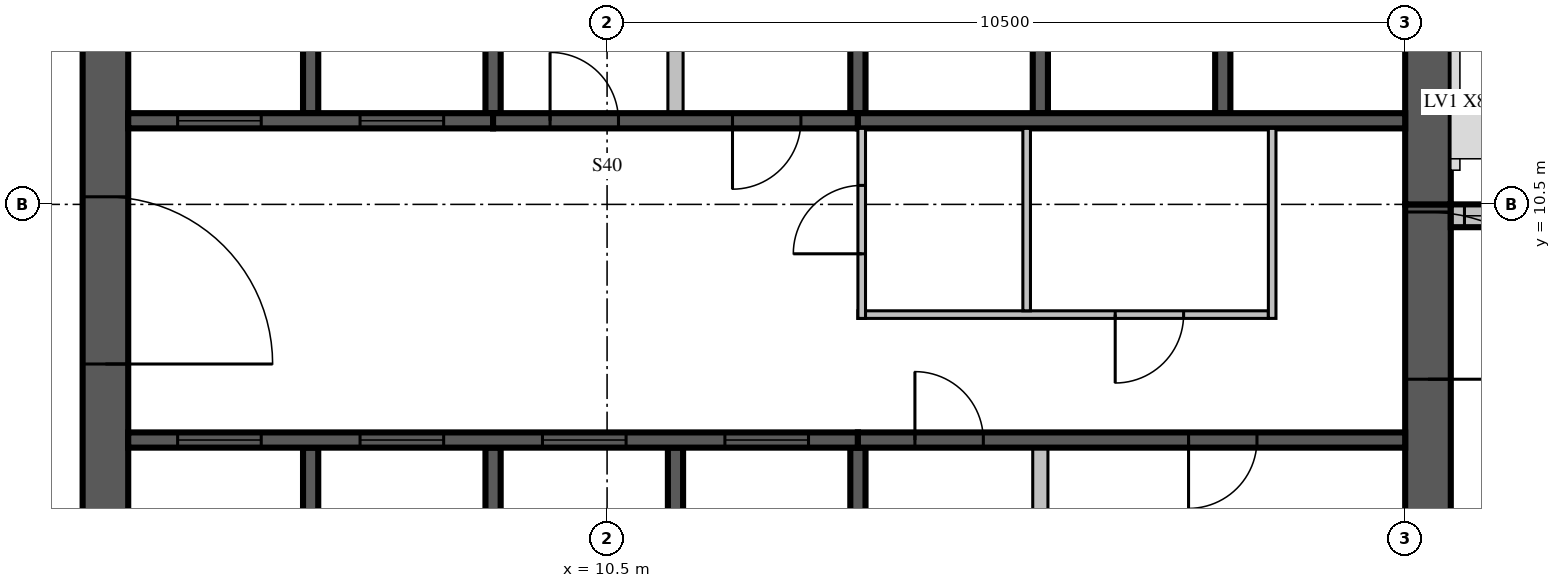
"""IFC4 building model, lengths in metres.
Left out: names, types, materials, properties, quantities, classifications, styles, units other than length and angle.
Written with IfcOpenShell. Run it as: python <this file> out.ifc"""

import sys

from ifc_helpers import new_model, si_unit, direction, frame, frame_2d, origin, place, context, subcontext, project, spatial, rectangle, extrude, source, transform, mapped, element, fill, save


model = new_model("IFC4")
c1 = context("Model", 3, precision=1e-05, world=origin(), true_north=direction((0.0, 1.0)))
c2 = subcontext(c1, "Body", "Model", "MODEL_VIEW")
j1 = project(units=[si_unit("LENGTHUNIT", "METRE"), si_unit("PLANEANGLEUNIT", "RADIAN")], contexts=[c1])
p1 = place(None, origin())
s1 = spatial("IfcSite", under=j1, at=p1, CompositionType="ELEMENT")
p2 = place(p1, origin())
s2 = spatial("IfcBuilding", under=s1, at=p2, CompositionType="ELEMENT")
p3 = place(p2, frame((0.0, 0.0, 316.0)))
s3 = spatial("IfcBuildingStorey", under=s2, at=p3, CompositionType="ELEMENT", Elevation=316.0)
m1 = source(origin(), c2, "Body", "SweptSolid", [
    extrude(rectangle(XDim=17.4, YDim=0.6, at=frame_2d((8.7, 0.0))), origin(), (0.0, 0.0, 1.0), 3.5),
])
p4 = place(p3, frame((3.9, 4.2, 0.0), z_axis=(0.0, 0.0, 1.0), x_axis=(0.0, 1.0, 0.0)))
e1 = element("IfcWall", 1, at=p4, inside=s3, PredefinedType="SHEAR", context=c2, shape_type="MappedRepresentation", body=[
    mapped(m1, transform((0.0, 0.0, 0.0), scale=1.0)),
])
m2 = source(origin(), c2, "Body", "SweptSolid", [
    extrude(rectangle(XDim=2.2, YDim=2.1, at=frame_2d((1.1, 1.05))), frame((0.0, 0.31, 0.0), z_axis=(0.0, -1.0, 0.0), x_axis=(1.0, 0.0, 0.0)), (0.0, 0.0, 1.0), 0.62),
])
p5 = place(p4, frame((4.2, 0.0, 0.0)))
e2 = element("IfcOpeningElement", 2, at=p5, cuts=e1, PredefinedType="OPENING", context=c2, shape_type="MappedRepresentation", body=[
    mapped(m2, transform((0.0, 0.0, 0.0), scale=1.0)),
])
m3 = source(origin(), c2, "Body", "SweptSolid", [
    extrude(rectangle(XDim=6.3, YDim=0.6, at=frame_2d((3.15, 0.0))), origin(), (0.0, 0.0, 1.0), 3.5),
])
p6 = place(p3, frame((21.3, 4.2, 0.0), z_axis=(0.0, 0.0, 1.0), x_axis=(0.0, 1.0, 0.0)))
e3 = element("IfcWall", 3, at=p6, inside=s3, PredefinedType="SHEAR", context=c2, shape_type="MappedRepresentation", body=[
    mapped(m3, transform((0.0, 0.0, 0.0), scale=1.0)),
])
p7 = place(p6, frame((4.0, 0.0, 0.0)))
e4 = element("IfcOpeningElement", 4, at=p7, cuts=e3, PredefinedType="OPENING", context=c2, shape_type="MappedRepresentation", body=[
    mapped(m2, transform((0.0, 0.0, 0.0), scale=1.0)),
])
m4 = source(origin(), c2, "Body", "SweptSolid", [
    extrude(rectangle(XDim=10.5, YDim=0.6, at=frame_2d((5.25, 0.0))), origin(), (0.0, 0.0, 1.0), 3.5),
])
p8 = place(p3, frame((21.3, 10.5, 0.0), z_axis=(0.0, 0.0, 1.0), x_axis=(0.0, 1.0, 0.0)))
e5 = element("IfcWall", 5, at=p8, inside=s3, PredefinedType="SHEAR", context=c2, shape_type="MappedRepresentation", body=[
    mapped(m4, transform((0.0, 0.0, 0.0), scale=1.0)),
])
m5 = source(origin(), c2, "Body", "SweptSolid", [
    extrude(rectangle(XDim=1.2, YDim=2.4, at=frame_2d((0.6, 1.2))), frame((0.0, 0.31, 0.0), z_axis=(0.0, -1.0, 0.0), x_axis=(1.0, 0.0, 0.0)), (0.0, 0.0, 1.0), 0.62),
])
p9 = place(p8, frame((5.7, 0.0, 0.6)))
e6 = element("IfcOpeningElement", 6, at=p9, cuts=e5, PredefinedType="OPENING", context=c2, shape_type="MappedRepresentation", body=[
    mapped(m5, transform((0.0, 0.0, 0.0), scale=1.0)),
])
m6 = source(origin(), c2, "Body", "SweptSolid", [
    extrude(rectangle(XDim=7.45, YDim=0.3, at=frame_2d((3.725, 0.0))), origin(), (0.0, 0.0, 1.0), 3.1),
])
p10 = place(p3, frame((29.05, 10.35, 0.0), z_axis=(0.0, 0.0, 1.0), x_axis=(-1.0, 0.0, 0.0)))
e7 = element("IfcWall", 7, at=p10, inside=s3, PredefinedType="STANDARD", context=c2, shape_type="MappedRepresentation", body=[
    mapped(m6, transform((0.0, 0.0, 0.0), scale=1.0)),
])
m7 = source(origin(), c2, "Body", "SweptSolid", [
    extrude(rectangle(XDim=3.0, YDim=2.0, at=frame_2d((1.5, 1.0))), frame((0.0, 0.16, 0.0), z_axis=(0.0, -1.0, 0.0), x_axis=(1.0, 0.0, 0.0)), (0.0, 0.0, 1.0), 0.32),
])
p11 = place(p10, frame((1.09, 0.0, 0.6)))
e8 = element("IfcOpeningElement", 8, at=p11, cuts=e7, PredefinedType="OPENING", context=c2, shape_type="MappedRepresentation", body=[
    mapped(m7, transform((0.0, 0.0, 0.0), scale=1.0)),
])
m8 = source(origin(), c2, "Body", "SweptSolid", [
    extrude(rectangle(XDim=1.8, YDim=2.0, at=frame_2d((0.9, 1.0))), frame((0.0, 0.16, 0.0), z_axis=(0.0, -1.0, 0.0), x_axis=(1.0, 0.0, 0.0)), (0.0, 0.0, 1.0), 0.32),
])
p12 = place(p10, frame((5.47, 0.0, 0.6)))
e9 = element("IfcOpeningElement", 9, at=p12, cuts=e7, PredefinedType="OPENING", context=c2, shape_type="MappedRepresentation", body=[
    mapped(m8, transform((0.0, 0.0, 0.0), scale=1.0)),
])
m9 = source(origin(), c2, "Body", "SweptSolid", [
    extrude(rectangle(XDim=3.1, YDim=0.2, at=frame_2d((1.55, 0.0))), origin(), (0.0, 0.0, 1.0), 3.5),
])
for number, where, z_axis, x_axis in (
    (10, (6.6, 4.2, 0.0), (0.0, 0.0, 1.0), (0.0, 1.0, 0.0)),
    (11, (9.0, 4.2, 0.0), (0.0, 0.0, 1.0), (0.0, 1.0, 0.0)),
    (12, (11.4, 4.2, 0.0), (0.0, 0.0, 1.0), (0.0, 1.0, 0.0)),
):
    element("IfcWall", number, at=place(p3, frame(where, z_axis=z_axis, x_axis=x_axis)), inside=s3, PredefinedType="SOLIDWALL", context=c2, shape_type="MappedRepresentation", body=[
        mapped(m9, transform((0.0, 0.0, 0.0), scale=1.0)),
    ])
m10 = source(origin(), c2, "Body", "SweptSolid", [
    extrude(rectangle(XDim=3.1, YDim=0.2, at=frame_2d((1.55, 0.0))), origin(), (0.0, 0.0, 1.0), 3.1),
])
p13 = place(p3, frame((13.8, 4.2, 0.0), z_axis=(0.0, 0.0, 1.0), x_axis=(0.0, 1.0, 0.0)))
e13 = element("IfcWall", 13, at=p13, inside=s3, PredefinedType="SOLIDWALL", context=c2, shape_type="MappedRepresentation", body=[
    mapped(m10, transform((0.0, 0.0, 0.0), scale=1.0)),
])
m11 = source(origin(), c2, "Body", "SweptSolid", [
    extrude(rectangle(XDim=3.1, YDim=0.2, at=frame_2d((1.55, 0.0))), origin(), (0.0, 0.0, 1.0), 3.1),
])
p14 = place(p3, frame((16.2, 4.2, 0.0), z_axis=(0.0, 0.0, 1.0), x_axis=(0.0, 1.0, 0.0)))
e14 = element("IfcWall", 14, at=p14, inside=s3, PredefinedType="PARTITIONING", context=c2, shape_type="MappedRepresentation", body=[
    mapped(m11, transform((0.0, 0.0, 0.0), scale=1.0)),
])
m12 = source(origin(), c2, "Body", "SweptSolid", [
    extrude(rectangle(XDim=3.0, YDim=0.2, at=frame_2d((1.5, 0.0))), origin(), (0.0, 0.0, 1.0), 3.5),
])
p15 = place(p3, frame((6.6, 11.7, 0.0), z_axis=(0.0, 0.0, 1.0), x_axis=(0.0, 1.0, 0.0)))
e15 = element("IfcWall", 15, at=p15, inside=s3, PredefinedType="SOLIDWALL", context=c2, shape_type="MappedRepresentation", body=[
    mapped(m12, transform((0.0, 0.0, 0.0), scale=1.0)),
])
m13 = source(origin(), c2, "Body", "SweptSolid", [
    extrude(rectangle(XDim=3.0, YDim=0.2, at=frame_2d((1.5, 0.0))), origin(), (0.0, 0.0, 1.0), 3.1),
])
for number, where, z_axis, x_axis in (
    (16, (9.0, 11.7, 0.0), (0.0, 0.0, 1.0), (0.0, 1.0, 0.0)),
    (17, (13.8, 11.7, 0.0), (0.0, 0.0, 1.0), (0.0, 1.0, 0.0)),
):
    element("IfcWall", number, at=place(p3, frame(where, z_axis=z_axis, x_axis=x_axis)), inside=s3, PredefinedType="SOLIDWALL", context=c2, shape_type="MappedRepresentation", body=[
        mapped(m13, transform((0.0, 0.0, 0.0), scale=1.0)),
    ])
for number, where, z_axis, x_axis in (
    (18, (16.2, 11.7, 0.0), (0.0, 0.0, 1.0), (0.0, 1.0, 0.0)),
    (19, (18.6, 11.7, 0.0), (0.0, 0.0, 1.0), (0.0, 1.0, 0.0)),
):
    element("IfcWall", number, at=place(p3, frame(where, z_axis=z_axis, x_axis=x_axis)), inside=s3, PredefinedType="SOLIDWALL", context=c2, shape_type="MappedRepresentation", body=[
        mapped(m12, transform((0.0, 0.0, 0.0), scale=1.0)),
    ])
m14 = source(origin(), c2, "Body", "SweptSolid", [
    extrude(rectangle(XDim=3.0, YDim=0.2, at=frame_2d((1.5, 0.0))), origin(), (0.0, 0.0, 1.0), 3.1),
])
p16 = place(p3, frame((11.4, 11.7, 0.0), z_axis=(0.0, 0.0, 1.0), x_axis=(0.0, 1.0, 0.0)))
e20 = element("IfcWall", 20, at=p16, inside=s3, PredefinedType="PARTITIONING", context=c2, shape_type="MappedRepresentation", body=[
    mapped(m14, transform((0.0, 0.0, 0.0), scale=1.0)),
])
m15 = source(origin(), c2, "Body", "SweptSolid", [
    extrude(rectangle(XDim=9.6, YDim=0.2, at=frame_2d((4.8, 0.0))), origin(), (0.0, 0.0, 1.0), 3.5),
])
p17 = place(p3, frame((4.2, 7.4, 0.0), z_axis=(0.0, 0.0, 1.0), x_axis=(1.0, 0.0, 0.0)))
e21 = element("IfcWall", 21, at=p17, inside=s3, PredefinedType="SOLIDWALL", context=c2, shape_type="MappedRepresentation", body=[
    mapped(m15, transform((0.0, 0.0, 0.0), scale=1.0)),
])
m16 = source(origin(), c2, "Body", "SweptSolid", [
    extrude(rectangle(XDim=1.1, YDim=2.1, at=frame_2d((0.55, 1.05))), frame((0.0, 0.11, 0.0), z_axis=(0.0, -1.0, 0.0), x_axis=(1.0, 0.0, 0.0)), (0.0, 0.0, 1.0), 0.22),
])
p18 = place(p17, frame((0.65, 0.0, 0.0)))
e22 = element("IfcOpeningElement", 22, at=p18, cuts=e21, PredefinedType="OPENING", context=c2, shape_type="MappedRepresentation", body=[
    mapped(m16, transform((0.0, 0.0, 0.0), scale=1.0)),
])
p19 = place(p17, frame((3.05, 0.0, 0.0)))
e23 = element("IfcOpeningElement", 23, at=p19, cuts=e21, PredefinedType="OPENING", context=c2, shape_type="MappedRepresentation", body=[
    mapped(m16, transform((0.0, 0.0, 0.0), scale=1.0)),
])
p20 = place(p17, frame((5.45, 0.0, 0.0)))
e24 = element("IfcOpeningElement", 24, at=p20, cuts=e21, PredefinedType="OPENING", context=c2, shape_type="MappedRepresentation", body=[
    mapped(m16, transform((0.0, 0.0, 0.0), scale=1.0)),
])
p21 = place(p17, frame((7.85, 0.0, 0.0)))
e25 = element("IfcOpeningElement", 25, at=p21, cuts=e21, PredefinedType="OPENING", context=c2, shape_type="MappedRepresentation", body=[
    mapped(m16, transform((0.0, 0.0, 0.0), scale=1.0)),
])
m17 = source(origin(), c2, "Body", "SweptSolid", [
    extrude(rectangle(XDim=7.2, YDim=0.2, at=frame_2d((3.6, 0.0))), origin(), (0.0, 0.0, 1.0), 3.1),
])
p22 = place(p3, frame((13.8, 7.4, 0.0), z_axis=(0.0, 0.0, 1.0), x_axis=(1.0, 0.0, 0.0)))
e26 = element("IfcWall", 26, at=p22, inside=s3, PredefinedType="SOLIDWALL", context=c2, shape_type="MappedRepresentation", body=[
    mapped(m17, transform((0.0, 0.0, 0.0), scale=1.0)),
])
m18 = source(origin(), c2, "Body", "SweptSolid", [
    extrude(rectangle(XDim=0.9, YDim=2.1, at=frame_2d((0.45, 1.05))), frame((0.0, 0.11, 0.0), z_axis=(0.0, -1.0, 0.0), x_axis=(1.0, 0.0, 0.0)), (0.0, 0.0, 1.0), 0.22),
])
p23 = place(p22, frame((0.75, 0.0, 0.0)))
e27 = element("IfcOpeningElement", 27, at=p23, cuts=e26, PredefinedType="OPENING", context=c2, shape_type="MappedRepresentation", body=[
    mapped(m18, transform((0.0, 0.0, 0.0), scale=1.0)),
])
p24 = place(p22, frame((4.35, 0.0, 0.0)))
e28 = element("IfcOpeningElement", 28, at=p24, cuts=e26, PredefinedType="OPENING", context=c2, shape_type="MappedRepresentation", body=[
    mapped(m18, transform((0.0, 0.0, 0.0), scale=1.0)),
])
m19 = source(origin(), c2, "Body", "SweptSolid", [
    extrude(rectangle(XDim=4.8, YDim=0.2, at=frame_2d((2.4, 0.0))), origin(), (0.0, 0.0, 1.0), 3.5),
])
p25 = place(p3, frame((4.2, 11.6, 0.0), z_axis=(0.0, 0.0, 1.0), x_axis=(1.0, 0.0, 0.0)))
e29 = element("IfcWall", 29, at=p25, inside=s3, PredefinedType="SOLIDWALL", context=c2, shape_type="MappedRepresentation", body=[
    mapped(m19, transform((0.0, 0.0, 0.0), scale=1.0)),
])
p26 = place(p25, frame((0.65, 0.0, 0.0)))
e30 = element("IfcOpeningElement", 30, at=p26, cuts=e29, PredefinedType="OPENING", context=c2, shape_type="MappedRepresentation", body=[
    mapped(m16, transform((0.0, 0.0, 0.0), scale=1.0)),
])
p27 = place(p25, frame((3.05, 0.0, 0.0)))
e31 = element("IfcOpeningElement", 31, at=p27, cuts=e29, PredefinedType="OPENING", context=c2, shape_type="MappedRepresentation", body=[
    mapped(m16, transform((0.0, 0.0, 0.0), scale=1.0)),
])
m20 = source(origin(), c2, "Body", "SweptSolid", [
    extrude(rectangle(XDim=4.8, YDim=0.2, at=frame_2d((2.4, 0.0))), origin(), (0.0, 0.0, 1.0), 3.1),
])
p28 = place(p3, frame((9.0, 11.6, 0.0), z_axis=(0.0, 0.0, 1.0), x_axis=(1.0, 0.0, 0.0)))
e32 = element("IfcWall", 32, at=p28, inside=s3, PredefinedType="SOLIDWALL", context=c2, shape_type="MappedRepresentation", body=[
    mapped(m20, transform((0.0, 0.0, 0.0), scale=1.0)),
])
p29 = place(p28, frame((0.75, 0.0, 0.0)))
e33 = element("IfcOpeningElement", 33, at=p29, cuts=e32, PredefinedType="OPENING", context=c2, shape_type="MappedRepresentation", body=[
    mapped(m18, transform((0.0, 0.0, 0.0), scale=1.0)),
])
p30 = place(p28, frame((3.15, 0.0, 0.0)))
e34 = element("IfcOpeningElement", 34, at=p30, cuts=e32, PredefinedType="OPENING", context=c2, shape_type="MappedRepresentation", body=[
    mapped(m18, transform((0.0, 0.0, 0.0), scale=1.0)),
])
m21 = source(origin(), c2, "Body", "SweptSolid", [
    extrude(rectangle(XDim=7.2, YDim=0.2, at=frame_2d((3.6, 0.0))), origin(), (0.0, 0.0, 1.0), 3.5),
])
p31 = place(p3, frame((13.8, 11.6, 0.0), z_axis=(0.0, 0.0, 1.0), x_axis=(1.0, 0.0, 0.0)))
e35 = element("IfcWall", 35, at=p31, inside=s3, PredefinedType="SOLIDWALL", context=c2, shape_type="MappedRepresentation", body=[
    mapped(m21, transform((0.0, 0.0, 0.0), scale=1.0)),
])
m22 = source(origin(), c2, "Body", "SweptSolid", [
    extrude(rectangle(XDim=5.4, YDim=0.1, at=frame_2d((2.7, 0.0))), origin(), (0.0, 0.0, 1.0), 3.1),
])
p32 = place(p3, frame((13.8, 9.05, 0.0), z_axis=(0.0, 0.0, 1.0), x_axis=(1.0, 0.0, 0.0)))
e36 = element("IfcWall", 36, at=p32, inside=s3, PredefinedType="PARTITIONING", context=c2, shape_type="MappedRepresentation", body=[
    mapped(m22, transform((0.0, 0.0, 0.0), scale=1.0)),
])
m23 = source(origin(), c2, "Body", "SweptSolid", [
    extrude(rectangle(XDim=0.9, YDim=2.1, at=frame_2d((0.45, 1.05))), frame((0.0, 0.06, 0.0), z_axis=(0.0, -1.0, 0.0), x_axis=(1.0, 0.0, 0.0)), (0.0, 0.0, 1.0), 0.12),
])
p33 = place(p32, frame((3.385, 0.0, 0.0)))
e37 = element("IfcOpeningElement", 37, at=p33, cuts=e36, PredefinedType="OPENING", context=c2, shape_type="MappedRepresentation", body=[
    mapped(m23, transform((0.0, 0.0, 0.0), scale=1.0)),
])
m24 = source(origin(), c2, "Body", "SweptSolid", [
    extrude(rectangle(XDim=2.5, YDim=0.1, at=frame_2d((1.25, 0.0))), origin(), (0.0, 0.0, 1.0), 3.1),
])
p34 = place(p3, frame((13.85, 9.0, 0.0), z_axis=(0.0, 0.0, 1.0), x_axis=(0.0, 1.0, 0.0)))
e38 = element("IfcWall", 38, at=p34, inside=s3, PredefinedType="PARTITIONING", context=c2, shape_type="MappedRepresentation", body=[
    mapped(m24, transform((0.0, 0.0, 0.0), scale=1.0)),
])
p35 = place(p34, frame((0.85, 0.0, 0.0)))
e39 = element("IfcOpeningElement", 39, at=p35, cuts=e38, PredefinedType="OPENING", context=c2, shape_type="MappedRepresentation", body=[
    mapped(m23, transform((0.0, 0.0, 0.0), scale=1.0)),
])
m25 = source(origin(), c2, "Body", "SweptSolid", [
    extrude(rectangle(XDim=2.4, YDim=0.1, at=frame_2d((1.2, 0.0))), origin(), (0.0, 0.0, 1.0), 3.1),
])
p36 = place(p3, frame((16.02, 9.1, 0.0), z_axis=(0.0, 0.0, 1.0), x_axis=(0.0, 1.0, 0.0)))
e40 = element("IfcWall", 40, at=p36, inside=s3, PredefinedType="PARTITIONING", context=c2, shape_type="MappedRepresentation", body=[
    mapped(m25, transform((0.0, 0.0, 0.0), scale=1.0)),
])
p37 = place(p3, frame((19.25, 9.0, 0.0), z_axis=(0.0, 0.0, 1.0), x_axis=(0.0, 1.0, 0.0)))
e41 = element("IfcWall", 41, at=p37, inside=s3, PredefinedType="PARTITIONING", context=c2, shape_type="MappedRepresentation", body=[
    mapped(m24, transform((0.0, 0.0, 0.0), scale=1.0)),
])
m26 = source(origin(), c2, "Body", "SweptSolid", [
    extrude(rectangle(XDim=1.8, YDim=2.0, at=frame_2d((0.9, 1.0))), frame((0.0, 0.03, 0.0), z_axis=(0.0, -1.0, 0.0), x_axis=(1.0, 0.0, 0.0)), (0.0, 0.0, 1.0), 0.06),
])
p38 = place(p12, origin())
e42 = element("IfcWindow", 42, at=p38, inside=s3, PartitioningType="SINGLE_PANEL", PredefinedType="WINDOW", context=c2, shape_type="MappedRepresentation", body=[
    mapped(m26, transform((0.0, 0.0, 0.0), scale=1.0)),
])
fill(e9, e42)
m27 = source(origin(), c2, "Body", "SweptSolid", [
    extrude(rectangle(XDim=1.1, YDim=2.1, at=frame_2d((0.55, 1.05))), frame((0.0, 0.025, 0.0), z_axis=(0.0, -1.0, 0.0), x_axis=(1.0, 0.0, 0.0)), (0.0, 0.0, 1.0), 0.05),
])
p39 = place(p18, origin())
e43 = element("IfcDoor", 43, at=p39, inside=s3, OperationType="SLIDING_TO_LEFT", PredefinedType="DOOR", context=c2, shape_type="MappedRepresentation", body=[
    mapped(m27, transform((0.0, 0.0, 0.0), scale=1.0)),
])
fill(e22, e43)
p40 = place(p19, origin())
e44 = element("IfcDoor", 44, at=p40, inside=s3, OperationType="SLIDING_TO_LEFT", PredefinedType="DOOR", context=c2, shape_type="MappedRepresentation", body=[
    mapped(m27, transform((0.0, 0.0, 0.0), scale=1.0)),
])
fill(e23, e44)
p41 = place(p20, origin())
e45 = element("IfcDoor", 45, at=p41, inside=s3, OperationType="SLIDING_TO_LEFT", PredefinedType="DOOR", context=c2, shape_type="MappedRepresentation", body=[
    mapped(m27, transform((0.0, 0.0, 0.0), scale=1.0)),
])
fill(e24, e45)
p42 = place(p21, origin())
e46 = element("IfcDoor", 46, at=p42, inside=s3, OperationType="SLIDING_TO_LEFT", PredefinedType="DOOR", context=c2, shape_type="MappedRepresentation", body=[
    mapped(m27, transform((0.0, 0.0, 0.0), scale=1.0)),
])
fill(e25, e46)
m28 = source(origin(), c2, "Body", "SweptSolid", [
    extrude(rectangle(XDim=0.9, YDim=2.1, at=frame_2d((0.45, 1.05))), frame((0.0, 0.025, 0.0), z_axis=(0.0, -1.0, 0.0), x_axis=(1.0, 0.0, 0.0)), (0.0, 0.0, 1.0), 0.05),
])
p43 = place(p23, origin())
e47 = element("IfcDoor", 47, at=p43, inside=s3, OperationType="SINGLE_SWING_LEFT", PredefinedType="DOOR", context=c2, shape_type="MappedRepresentation", body=[
    mapped(m28, transform((0.0, 0.0, 0.0), scale=1.0)),
])
fill(e27, e47)
p44 = place(p24, origin())
e48 = element("IfcDoor", 48, at=p44, inside=s3, OperationType="SINGLE_SWING_RIGHT", PredefinedType="DOOR", context=c2, shape_type="MappedRepresentation", body=[
    mapped(m28, transform((0.0, 0.0, 0.0), scale=1.0)),
])
fill(e28, e48)
p45 = place(p26, origin())
e49 = element("IfcDoor", 49, at=p45, inside=s3, OperationType="SLIDING_TO_LEFT", PredefinedType="DOOR", context=c2, shape_type="MappedRepresentation", body=[
    mapped(m27, transform((0.0, 0.0, 0.0), scale=1.0)),
])
fill(e30, e49)
p46 = place(p27, origin())
e50 = element("IfcDoor", 50, at=p46, inside=s3, OperationType="SLIDING_TO_LEFT", PredefinedType="DOOR", context=c2, shape_type="MappedRepresentation", body=[
    mapped(m27, transform((0.0, 0.0, 0.0), scale=1.0)),
])
fill(e31, e50)
p47 = place(p29, origin())
e51 = element("IfcDoor", 51, at=p47, inside=s3, OperationType="SINGLE_SWING_LEFT", PredefinedType="DOOR", context=c2, shape_type="MappedRepresentation", body=[
    mapped(m28, transform((0.0, 0.0, 0.0), scale=1.0)),
])
fill(e33, e51)
p48 = place(p30, origin())
e52 = element("IfcDoor", 52, at=p48, inside=s3, OperationType="SINGLE_SWING_RIGHT", PredefinedType="DOOR", context=c2, shape_type="MappedRepresentation", body=[
    mapped(m28, transform((0.0, 0.0, 0.0), scale=1.0)),
])
fill(e34, e52)
p49 = place(p33, origin())
e53 = element("IfcDoor", 53, at=p49, inside=s3, OperationType="SINGLE_SWING_RIGHT", PredefinedType="DOOR", context=c2, shape_type="MappedRepresentation", body=[
    mapped(m28, transform((0.0, 0.0, 0.0), scale=1.0)),
])
fill(e37, e53)
p50 = place(p35, origin())
e54 = element("IfcDoor", 54, at=p50, inside=s3, OperationType="SINGLE_SWING_LEFT", PredefinedType="DOOR", context=c2, shape_type="MappedRepresentation", body=[
    mapped(m28, transform((0.0, 0.0, 0.0), scale=1.0)),
])
fill(e39, e54)
m29 = source(origin(), c2, "Body", "SweptSolid", [
    extrude(rectangle(XDim=2.2, YDim=2.1, at=frame_2d((1.1, 1.05))), frame((0.0, 0.025, 0.0), z_axis=(0.0, -1.0, 0.0), x_axis=(1.0, 0.0, 0.0)), (0.0, 0.0, 1.0), 0.05),
])
p51 = place(p7, origin())
e55 = element("IfcDoor", 55, at=p51, inside=s3, OperationType="DOUBLE_DOOR_SINGLE_SWING", PredefinedType="DOOR", context=c2, shape_type="MappedRepresentation", body=[
    mapped(m29, transform((0.0, 0.0, 0.0), scale=1.0)),
])
fill(e4, e55)
p52 = place(p5, origin())
e56 = element("IfcDoor", 56, at=p52, inside=s3, OperationType="DOUBLE_DOOR_SINGLE_SWING", PredefinedType="DOOR", context=c2, shape_type="MappedRepresentation", body=[
    mapped(m29, transform((0.0, 0.0, 0.0), scale=1.0)),
])
fill(e2, e56)
save(model, sys.argv[1])
